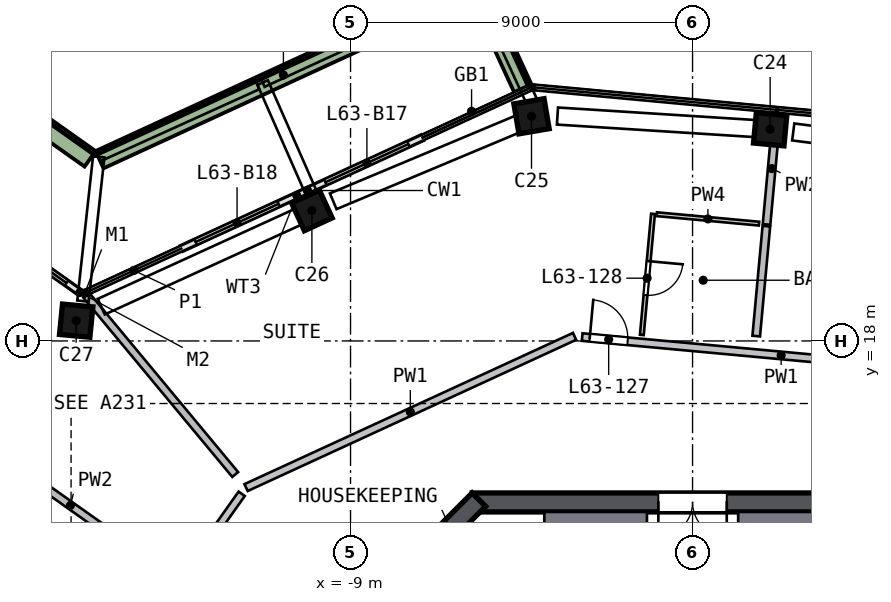
"""IFC4 building model, lengths in metres.
Left out: names, types, materials, properties, quantities, classifications, styles, units other than length and angle.
Written with IfcOpenShell. Run it as: python <this file> out.ifc"""

import sys

from ifc_helpers import new_model, si_unit, direction, frame, frame_2d, origin, origin_2d, place, context, subcontext, project, spatial, polyline, rectangle, outline, extrude, element, fill, save


model = new_model("IFC4")
c1 = context("Model", 3, precision=1e-05, world=origin(), true_north=direction((0.0, 1.0)))
c2 = subcontext(c1, "Body", "Model", "MODEL_VIEW")
j1 = project(units=[si_unit("LENGTHUNIT", "METRE"), si_unit("PLANEANGLEUNIT", "RADIAN")], contexts=[c1])
p1 = place(None, origin())
s1 = spatial("IfcSite", under=j1, at=p1, CompositionType="ELEMENT")
p2 = place(p1, origin())
s2 = spatial("IfcBuilding", under=s1, at=p2, CompositionType="ELEMENT")
p3 = place(p2, frame((0.0, 0.0, 256.0)))
s3 = spatial("IfcBuildingStorey", under=s2, at=p3, CompositionType="ELEMENT", Elevation=256.0)
p4 = place(p3, frame((2.177, 23.558, 0.0), z_axis=(-0.112095822, 0.009430042, 0.993652656), x_axis=(-0.98941317, 0.091695583, -0.112487775)))
e1 = element("IfcColumn", 1, at=p4, inside=s3, PredefinedType="COLUMN", context=c2, shape_type="SweptSolid", body=[
    extrude(rectangle(XDim=0.8, YDim=0.8, at=origin_2d()), origin(), (0.0, 0.0, 1.0), 3.21),
])
p5 = place(p3, frame((-4.1, 23.937, 0.0), z_axis=(-0.113653633, -0.020450052, 0.993309945), x_axis=(0.97906917, 0.167598199, 0.115474692)))
e2 = element("IfcColumn", 2, at=p5, inside=s3, PredefinedType="COLUMN", context=c2, shape_type="SweptSolid", body=[
    extrude(rectangle(XDim=0.8, YDim=0.8, at=origin_2d()), origin(), (0.0, 0.0, 1.0), 3.211),
])
p6 = place(p3, frame((-9.894, 21.49, 0.0), z_axis=(-0.101828723, -0.047910452, 0.993647573), x_axis=(-0.902658976, -0.415383165, -0.112532662)))
e3 = element("IfcColumn", 3, at=p6, inside=s3, PredefinedType="COLUMN", context=c2, shape_type="SweptSolid", body=[
    extrude(rectangle(XDim=0.8, YDim=0.8, at=origin_2d()), origin(), (0.0, 0.0, 1.0), 3.21),
])
p7 = place(p3, frame((-16.113, 18.627, 0.0), z_axis=(-0.087941372, -0.077300238, 0.99312184), x_axis=(0.991858021, -0.098983039, 0.080125056)))
e4 = element("IfcColumn", 4, at=p7, inside=s3, PredefinedType="COLUMN", context=c2, shape_type="SweptSolid", body=[
    extrude(rectangle(XDim=0.8, YDim=0.8, at=origin_2d()), origin(), (0.0, 0.0, 1.0), 3.212),
])
p8 = place(p3, frame((5.799, 13.75, 0.0), z_axis=(0.0, 0.0, 1.0), x_axis=(-1.0, 0.0, 0.0)))
e5 = element("IfcWall", 5, at=p8, inside=s3, PredefinedType="SHEAR", context=c2, shape_type="SweptSolid", body=[
    extrude(rectangle(XDim=11.598, YDim=0.5, at=frame_2d((5.799, 0.0))), origin(), (0.0, 0.0, 1.0), 3.5),
])
p9 = place(p8, frame((4.899, 0.0, 0.0)))
e6 = element("IfcOpeningElement", 6, at=p9, cuts=e5, PredefinedType="OPENING", context=c2, shape_type="SweptSolid", body=[
    extrude(rectangle(XDim=1.8, YDim=2.1, at=frame_2d((0.9, 1.05))), frame((0.0, 0.26, 0.0), z_axis=(0.0, -1.0, 0.0), x_axis=(1.0, 0.0, 0.0)), (0.0, 0.0, 1.0), 0.52),
])
p10 = place(p3, frame((-5.622, 13.823, 0.0), z_axis=(0.0, 0.0, 1.0), x_axis=(-0.707106781, -0.707106781, 0.0)))
e7 = element("IfcWall", 7, at=p10, inside=s3, PredefinedType="SHEAR", context=c2, shape_type="SweptSolid", body=[
    extrude(rectangle(XDim=11.598, YDim=0.5, at=frame_2d((5.799, 0.0))), origin(), (0.0, 0.0, 1.0), 3.5),
])
p11 = place(p3, frame((-16.149, 19.296, 0.0), z_axis=(0.0, 0.0, 1.0), x_axis=(-0.816354224, 0.57755154, 0.0)))
e8 = element("IfcWall", 8, at=p11, inside=s3, PredefinedType="SOLIDWALL", context=c2, shape_type="SweptSolid", body=[
    extrude(rectangle(XDim=3.2, YDim=0.15, at=frame_2d((1.6, 0.0))), origin(), (0.0, 0.0, 1.0), 2.525),
])
p12 = place(p11, frame((0.4, 0.0, 0.0)))
e9 = element("IfcOpeningElement", 9, at=p12, cuts=e8, PredefinedType="OPENING", context=c2, shape_type="SweptSolid", body=[
    extrude(rectangle(XDim=2.4, YDim=2.4, at=frame_2d((1.2, 1.2))), frame((0.0, 0.085, 0.0), z_axis=(0.0, -1.0, 0.0), x_axis=(1.0, 0.0, 0.0)), (0.0, 0.0, 1.0), 0.17),
])
p13 = place(p3, frame((-7.115, 23.347, 0.0), z_axis=(0.0, 0.0, 1.0), x_axis=(-0.908374691, -0.418157172, 0.0)))
e10 = element("IfcWall", 10, at=p13, inside=s3, PredefinedType="SOLIDWALL", context=c2, shape_type="SweptSolid", body=[
    extrude(rectangle(XDim=3.3, YDim=0.15, at=frame_2d((1.65, 0.0))), origin(), (0.0, 0.0, 1.0), 2.525),
])
p14 = place(p13, frame((0.4, 0.0, 0.0)))
e11 = element("IfcOpeningElement", 11, at=p14, cuts=e10, PredefinedType="OPENING", context=c2, shape_type="SweptSolid", body=[
    extrude(rectangle(XDim=2.4, YDim=2.4, at=frame_2d((1.2, 1.2))), frame((0.0, 0.085, 0.0), z_axis=(0.0, -1.0, 0.0), x_axis=(1.0, 0.0, 0.0)), (0.0, 0.0, 1.0), 0.17),
])
p15 = place(p3, frame((-10.113, 21.967, 0.0), z_axis=(0.0, 0.0, 1.0), x_axis=(-0.908353196, -0.418203864, 0.0)))
e12 = element("IfcWall", 12, at=p15, inside=s3, PredefinedType="SOLIDWALL", context=c2, shape_type="SweptSolid", body=[
    extrude(rectangle(XDim=3.661, YDim=0.15, at=frame_2d((1.831, 0.0))), origin(), (0.0, 0.0, 1.0), 2.525),
])
p16 = place(p15, frame((0.861, 0.0, 0.0)))
e13 = element("IfcOpeningElement", 13, at=p16, cuts=e12, PredefinedType="OPENING", context=c2, shape_type="SweptSolid", body=[
    extrude(rectangle(XDim=2.4, YDim=2.4, at=frame_2d((1.2, 1.2))), frame((0.0, 0.085, 0.0), z_axis=(0.0, -1.0, 0.0), x_axis=(1.0, 0.0, 0.0)), (0.0, 0.0, 1.0), 0.17),
])
p17 = place(p3, frame((-4.468, 24.65, 0.0), z_axis=(0.0, 0.0, 1.0), x_axis=(-0.418225571, 0.908343202, 0.0)))
e14 = element("IfcWall", 14, at=p17, inside=s3, PredefinedType="SOLIDWALL", context=c2, shape_type="SweptSolid", body=[
    extrude(rectangle(XDim=3.199, YDim=0.5, at=frame_2d((1.6, 0.0))), origin(), (0.0, 0.0, 1.0), 0.7),
])
p18 = place(p3, frame((-5.928, 27.224, 0.0), z_axis=(0.0, 0.0, 1.0), x_axis=(-0.908365459, -0.418177226, 0.0)))
e15 = element("IfcWall", 15, at=p18, inside=s3, PredefinedType="SOLIDWALL", context=c2, shape_type="SweptSolid", body=[
    extrude(rectangle(XDim=10.652, YDim=0.5, at=frame_2d((5.326, 0.0))), origin(), (0.0, 0.0, 1.0), 0.7),
])
p19 = place(p3, frame((-15.853, 22.792, 0.0), z_axis=(0.0, 0.0, 1.0), x_axis=(-0.816345925, 0.57756327, 0.0)))
e16 = element("IfcWall", 16, at=p19, inside=s3, PredefinedType="SOLIDWALL", context=c2, shape_type="SweptSolid", body=[
    extrude(rectangle(XDim=4.148, YDim=0.5, at=frame_2d((2.074, 0.0))), origin(), (0.0, 0.0, 1.0), 0.7),
])
p20 = place(p3, origin())
e17 = element("IfcWall", 17, at=p20, inside=s3, PredefinedType="SOLIDWALL", context=c2, shape_type="SweptSolid", body=[
    extrude(outline(polyline([(3.9, 9.9), (3.7, 9.9), (3.7, 12.9), (1.4, 12.9), (1.4, 9.9), (1.2, 9.9), (1.2, 13.5), (3.9, 13.5), (3.9, 9.9)])), origin(), (0.0, 0.0, 1.0), 3.19),
])
p21 = place(p3, origin())
e18 = element("IfcWall", 18, at=p21, inside=s3, PredefinedType="SOLIDWALL", context=c2, shape_type="SweptSolid", body=[
    extrude(outline(polyline([(-3.9, 13.5), (-1.2, 13.5), (-1.2, 9.9), (-1.4, 9.9), (-1.4, 12.9), (-3.7, 12.9), (-3.7, 9.9), (-3.9, 9.9), (-3.9, 13.5)])), origin(), (0.0, 0.0, 1.0), 3.19),
])
p22 = place(p3, frame((-17.245, 6.372, 0.0), z_axis=(0.0, 0.0, 1.0), x_axis=(0.577581016, 0.81633337, 0.0)))
e19 = element("IfcWall", 19, at=p22, inside=s3, PredefinedType="SOLIDWALL", context=c2, shape_type="SweptSolid", body=[
    extrude(rectangle(XDim=9.317, YDim=0.2, at=frame_2d((4.658, 0.0))), origin(), (0.0, 0.0, 1.0), 3.19),
])
p23 = place(p22, frame((3.848, 0.0, 0.0)))
e20 = element("IfcOpeningElement", 20, at=p23, cuts=e19, PredefinedType="OPENING", context=c2, shape_type="SweptSolid", body=[
    extrude(rectangle(XDim=1.8, YDim=2.1, at=frame_2d((0.9, 1.05))), frame((0.0, 0.11, 0.0), z_axis=(0.0, -1.0, 0.0), x_axis=(1.0, 0.0, 0.0)), (0.0, 0.0, 1.0), 0.22),
])
p24 = place(p3, frame((-3.104, 18.121, 0.0), z_axis=(0.0, 0.0, 1.0), x_axis=(-0.908361445, -0.418185945, 0.0)))
e21 = element("IfcWall", 21, at=p24, inside=s3, PredefinedType="SOLIDWALL", context=c2, shape_type="SweptSolid", body=[
    extrude(rectangle(XDim=9.516, YDim=0.2, at=frame_2d((4.758, 0.0))), origin(), (0.0, 0.0, 1.0), 3.19),
])
p25 = place(p3, frame((-2.904, 18.102, 0.0), z_axis=(0.0, 0.0, 1.0), x_axis=(0.995759095, -0.091999045, 0.0)))
e22 = element("IfcWall", 22, at=p25, inside=s3, PredefinedType="SOLIDWALL", context=c2, shape_type="SweptSolid", body=[
    extrude(rectangle(XDim=9.115, YDim=0.2, at=frame_2d((4.558, 0.0))), origin(), (0.0, 0.0, 1.0), 3.19),
])
p26 = place(p25, frame((0.2, 0.0, 0.0)))
e23 = element("IfcOpeningElement", 23, at=p26, cuts=e22, PredefinedType="OPENING", context=c2, shape_type="SweptSolid", body=[
    extrude(rectangle(XDim=1.0, YDim=2.1, at=frame_2d((0.5, 1.05))), frame((0.0, 0.11, 0.0), z_axis=(0.0, -1.0, 0.0), x_axis=(1.0, 0.0, 0.0)), (0.0, 0.0, 1.0), 0.22),
])
p27 = place(p3, frame((-15.59, 9.058, 0.0), z_axis=(0.0, 0.0, 1.0), x_axis=(-0.816355957, 0.57754909, 0.0)))
e24 = element("IfcWall", 24, at=p27, inside=s3, PredefinedType="SOLIDWALL", context=c2, shape_type="SweptSolid", body=[
    extrude(rectangle(XDim=10.302, YDim=0.2, at=frame_2d((5.151, 0.0))), origin(), (0.0, 0.0, 1.0), 3.19),
])
p28 = place(p27, frame((2.95, 0.0, 0.0)))
e25 = element("IfcOpeningElement", 25, at=p28, cuts=e24, PredefinedType="OPENING", context=c2, shape_type="SweptSolid", body=[
    extrude(rectangle(XDim=1.0, YDim=2.1, at=frame_2d((0.5, 1.05))), frame((0.0, 0.11, 0.0), z_axis=(0.0, -1.0, 0.0), x_axis=(1.0, 0.0, 0.0)), (0.0, 0.0, 1.0), 0.22),
])
p29 = place(p3, frame((-22.085, 17.714, 0.0), z_axis=(0.0, 0.0, 1.0), x_axis=(0.816344784, -0.577564883, 0.0)))
e26 = element("IfcWall", 26, at=p29, inside=s3, PredefinedType="SOLIDWALL", context=c2, shape_type="SweptSolid", body=[
    extrude(rectangle(XDim=10.302, YDim=0.2, at=frame_2d((5.151, 0.0))), origin(), (0.0, 0.0, 1.0), 3.19),
])
p30 = place(p29, frame((2.5, 0.0, 0.0)))
e27 = element("IfcOpeningElement", 27, at=p30, cuts=e26, PredefinedType="OPENING", context=c2, shape_type="SweptSolid", body=[
    extrude(rectangle(XDim=1.0, YDim=2.1, at=frame_2d((0.5, 1.05))), frame((0.0, 0.11, 0.0), z_axis=(0.0, -1.0, 0.0), x_axis=(1.0, 0.0, 0.0)), (0.0, 0.0, 1.0), 0.22),
])
p31 = place(p3, frame((-15.953, 19.202, 0.0), z_axis=(0.0, 0.0, 1.0), x_axis=(0.639032378, -0.769179836, 0.0)))
e28 = element("IfcWall", 28, at=p31, inside=s3, PredefinedType="SOLIDWALL", context=c2, shape_type="SweptSolid", body=[
    extrude(rectangle(XDim=6.132, YDim=0.2, at=frame_2d((3.066, 0.0))), origin(), (0.0, 0.0, 1.0), 3.19),
])
p32 = place(p3, frame((1.675, 18.128, 0.0), z_axis=(0.0, 0.0, 1.0), x_axis=(0.092036166, 0.995755665, 0.0)))
e29 = element("IfcWall", 29, at=p32, inside=s3, PredefinedType="SOLIDWALL", context=c2, shape_type="SweptSolid", body=[
    extrude(rectangle(XDim=2.905, YDim=0.2, at=frame_2d((1.452, 0.0))), origin(), (0.0, 0.0, 1.0), 3.19),
])
p33 = place(p3, frame((1.947, 21.067, 0.0), z_axis=(0.0, 0.0, 1.0), x_axis=(0.091967389, 0.995762019, 0.0)))
e30 = element("IfcWall", 30, at=p33, inside=s3, PredefinedType="SOLIDWALL", context=c2, shape_type="SweptSolid", body=[
    extrude(rectangle(XDim=2.952, YDim=0.2, at=frame_2d((1.476, 0.0))), origin(), (0.0, 0.0, 1.0), 3.19),
])
p34 = place(p3, frame((-1.04, 21.344, 0.0), z_axis=(0.0, 0.0, 1.0), x_axis=(-0.09201469, -0.99575765, 0.0)))
e31 = element("IfcWall", 31, at=p34, inside=s3, PredefinedType="PARTITIONING", context=c2, shape_type="SweptSolid", body=[
    extrude(rectangle(XDim=3.2, YDim=0.1, at=frame_2d((1.6, 0.0))), origin(), (0.0, 0.0, 1.0), 3.19),
])
p35 = place(p34, frame((1.25, 0.0, 0.0)))
e32 = element("IfcOpeningElement", 32, at=p35, cuts=e31, PredefinedType="OPENING", context=c2, shape_type="SweptSolid", body=[
    extrude(rectangle(XDim=0.9, YDim=2.1, at=frame_2d((0.45, 1.05))), frame((0.0, 0.06, 0.0), z_axis=(0.0, -1.0, 0.0), x_axis=(1.0, 0.0, 0.0)), (0.0, 0.0, 1.0), 0.12),
])
p36 = place(p3, frame((-0.941, 21.335, 0.0), z_axis=(0.0, 0.0, 1.0), x_axis=(0.995754192, -0.092052104, 0.0)))
e33 = element("IfcWall", 33, at=p36, inside=s3, PredefinedType="PARTITIONING", context=c2, shape_type="SweptSolid", body=[
    extrude(rectangle(XDim=2.7, YDim=0.1, at=frame_2d((1.35, 0.0))), origin(), (0.0, 0.0, 1.0), 3.19),
])
p37 = place(p12, origin())
e34 = element("IfcDoor", 34, at=p37, inside=s3, OperationType="SLIDING_TO_LEFT", PredefinedType="DOOR", context=c2, shape_type="SweptSolid", body=[
    extrude(rectangle(XDim=2.4, YDim=2.4, at=frame_2d((1.2, 1.2))), frame((0.0, 0.025, 0.0), z_axis=(0.0, -1.0, 0.0), x_axis=(1.0, 0.0, 0.0)), (0.0, 0.0, 1.0), 0.05),
])
fill(e9, e34)
p38 = place(p14, origin())
e35 = element("IfcDoor", 35, at=p38, inside=s3, OperationType="SLIDING_TO_RIGHT", PredefinedType="DOOR", context=c2, shape_type="SweptSolid", body=[
    extrude(rectangle(XDim=2.4, YDim=2.4, at=frame_2d((1.2, 1.2))), frame((0.0, 0.025, 0.0), z_axis=(0.0, -1.0, 0.0), x_axis=(1.0, 0.0, 0.0)), (0.0, 0.0, 1.0), 0.05),
])
fill(e11, e35)
p39 = place(p16, origin())
e36 = element("IfcDoor", 36, at=p39, inside=s3, OperationType="SLIDING_TO_LEFT", PredefinedType="DOOR", context=c2, shape_type="SweptSolid", body=[
    extrude(rectangle(XDim=2.4, YDim=2.4, at=frame_2d((1.2, 1.2))), frame((0.0, 0.025, 0.0), z_axis=(0.0, -1.0, 0.0), x_axis=(1.0, 0.0, 0.0)), (0.0, 0.0, 1.0), 0.05),
])
fill(e13, e36)
p40 = place(p9, origin())
e37 = element("IfcDoor", 37, at=p40, inside=s3, OperationType="DOUBLE_DOOR_SINGLE_SWING", PredefinedType="DOOR", context=c2, shape_type="SweptSolid", body=[
    extrude(rectangle(XDim=1.8, YDim=2.1, at=frame_2d((0.9, 1.05))), frame((0.0, 0.025, 0.0), z_axis=(0.0, -1.0, 0.0), x_axis=(1.0, 0.0, 0.0)), (0.0, 0.0, 1.0), 0.05),
])
fill(e6, e37)
p41 = place(p26, origin())
e38 = element("IfcDoor", 38, at=p41, inside=s3, OperationType="SINGLE_SWING_LEFT", PredefinedType="DOOR", context=c2, shape_type="SweptSolid", body=[
    extrude(rectangle(XDim=1.0, YDim=2.1, at=frame_2d((0.5, 1.05))), frame((0.0, 0.025, 0.0), z_axis=(0.0, -1.0, 0.0), x_axis=(1.0, 0.0, 0.0)), (0.0, 0.0, 1.0), 0.05),
])
fill(e23, e38)
p42 = place(p35, origin())
e39 = element("IfcDoor", 39, at=p42, inside=s3, OperationType="SINGLE_SWING_LEFT", PredefinedType="DOOR", context=c2, shape_type="SweptSolid", body=[
    extrude(rectangle(XDim=0.9, YDim=2.1, at=frame_2d((0.45, 1.05))), frame((0.0, 0.025, 0.0), z_axis=(0.0, -1.0, 0.0), x_axis=(1.0, 0.0, 0.0)), (0.0, 0.0, 1.0), 0.05),
])
fill(e32, e39)
save(model, sys.argv[1])
